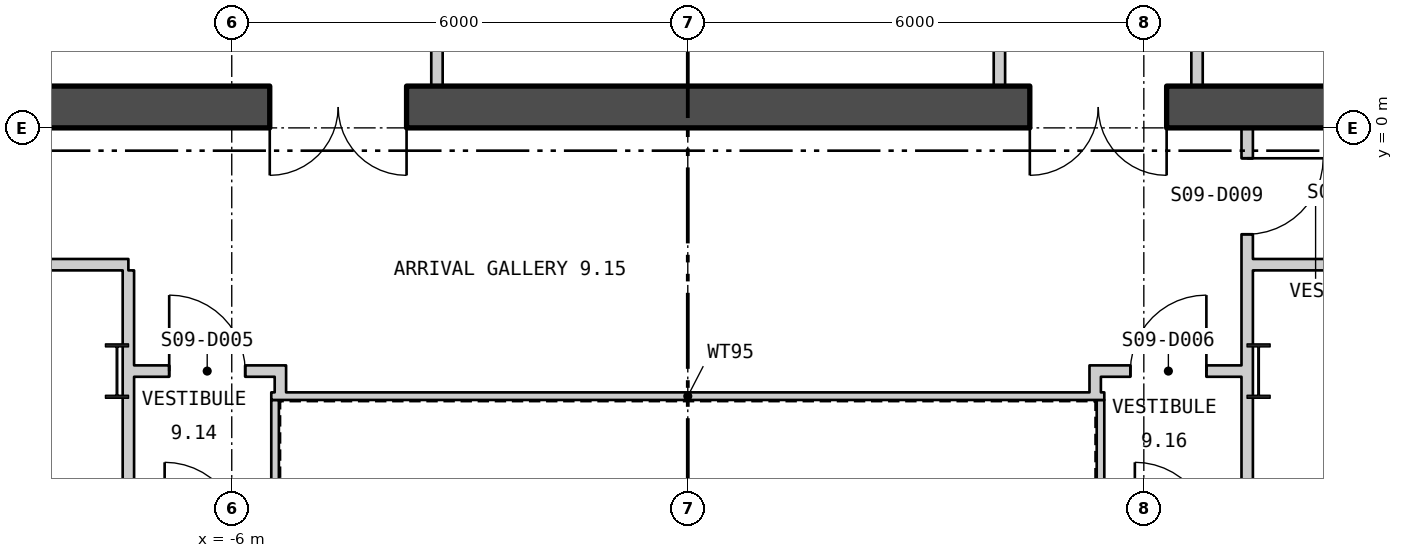
"""IFC4 building model, lengths in metres.
Left out: names, types, materials, properties, quantities, classifications, styles, units other than length and angle.
Written with IfcOpenShell. Run it as: python <this file> out.ifc"""

import sys

from ifc_helpers import new_model, si_unit, direction, frame, frame_2d, origin, origin_2d, place, context, subcontext, project, spatial, polyline, rectangle, i_section, outline, extrude, element, fill, save


model = new_model("IFC4")
c1 = context("Model", 3, precision=1e-05, world=origin(), true_north=direction((0.0, 1.0)))
c2 = subcontext(c1, "Body", "Model", "MODEL_VIEW")
j1 = project(units=[si_unit("LENGTHUNIT", "METRE"), si_unit("PLANEANGLEUNIT", "RADIAN")], contexts=[c1])
p1 = place(None, origin())
s1 = spatial("IfcSite", under=j1, at=p1, CompositionType="ELEMENT")
p2 = place(p1, origin())
s2 = spatial("IfcBuilding", under=s1, at=p2, CompositionType="ELEMENT")
p3 = place(p2, frame((0.0, 0.0, 124.8)))
s3 = spatial("IfcBuildingStorey", under=s2, at=p3, CompositionType="ELEMENT", Elevation=124.8)
for number, where, z_axis, x_axis in (
    (1, (7.51, -3.2, 0.0), (0.0, 0.0, 1.0), (1.0, 0.0, 0.0)),
    (2, (-7.51, -3.2, 0.0), (0.0, 0.0, 1.0), (1.0, 0.0, 0.0)),
):
    element("IfcColumn", number, at=place(p3, frame(where, z_axis=z_axis, x_axis=x_axis)), inside=s3, PredefinedType="COLUMN", context=c2, shape_type="SweptSolid", body=[
        extrude(i_section(OverallWidth=0.304, OverallDepth=0.716, WebThickness=0.021, FlangeThickness=0.04, at=origin_2d()), origin(), (0.0, 0.0, 1.0), 4.5),
    ])
p4 = place(p3, frame((-27.45, 12.042, -0.18), z_axis=(0.0, 0.0, 1.0), x_axis=(0.500000711659, -0.866024992908, 0.0)))
e3 = element("IfcWall", 3, at=p4, inside=s3, PredefinedType="SOLIDWALL", context=c2, shape_type="SweptSolid", body=[
    extrude(outline(polyline([(-0.13, -0.225), (45.87, -0.225), (45.61, 0.225), (0.13, 0.225), (-0.13, -0.225)])), origin(), (0.0, 0.0, 1.0), 4.28),
])
p5 = place(p4, frame((1.424, 0.0, 1.08)))
e4 = element("IfcOpeningElement", 4, at=p5, cuts=e3, PredefinedType="OPENING", context=c2, shape_type="SweptSolid", body=[
    extrude(rectangle(XDim=2.4, YDim=2.6, at=frame_2d((1.2, 1.3))), frame((0.0, 0.235, 0.0), z_axis=(0.0, -1.0, 0.0), x_axis=(1.0, 0.0, 0.0)), (0.0, 0.0, 1.0), 0.47),
])
p6 = place(p4, frame((5.893, 0.0, 1.08)))
e5 = element("IfcOpeningElement", 5, at=p6, cuts=e3, PredefinedType="OPENING", context=c2, shape_type="SweptSolid", body=[
    extrude(rectangle(XDim=2.4, YDim=2.6, at=frame_2d((1.2, 1.3))), frame((0.0, 0.235, 0.0), z_axis=(0.0, -1.0, 0.0), x_axis=(1.0, 0.0, 0.0)), (0.0, 0.0, 1.0), 0.47),
])
p7 = place(p4, frame((10.401, 0.0, 1.08)))
e6 = element("IfcOpeningElement", 6, at=p7, cuts=e3, PredefinedType="OPENING", context=c2, shape_type="SweptSolid", body=[
    extrude(rectangle(XDim=2.4, YDim=2.6, at=frame_2d((1.2, 1.3))), frame((0.0, 0.235, 0.0), z_axis=(0.0, -1.0, 0.0), x_axis=(1.0, 0.0, 0.0)), (0.0, 0.0, 1.0), 0.47),
])
p8 = place(p4, frame((19.416, 0.0, 1.08)))
e7 = element("IfcOpeningElement", 7, at=p8, cuts=e3, PredefinedType="OPENING", context=c2, shape_type="SweptSolid", body=[
    extrude(rectangle(XDim=2.4, YDim=2.6, at=frame_2d((1.2, 1.3))), frame((0.0, 0.235, 0.0), z_axis=(0.0, -1.0, 0.0), x_axis=(1.0, 0.0, 0.0)), (0.0, 0.0, 1.0), 0.47),
])
p9 = place(p4, frame((23.924, 0.0, 1.08)))
e8 = element("IfcOpeningElement", 8, at=p9, cuts=e3, PredefinedType="OPENING", context=c2, shape_type="SweptSolid", body=[
    extrude(rectangle(XDim=2.4, YDim=2.6, at=frame_2d((1.2, 1.3))), frame((0.0, 0.235, 0.0), z_axis=(0.0, -1.0, 0.0), x_axis=(1.0, 0.0, 0.0)), (0.0, 0.0, 1.0), 0.47),
])
p10 = place(p4, frame((28.431, 0.0, 1.08)))
e9 = element("IfcOpeningElement", 9, at=p10, cuts=e3, PredefinedType="OPENING", context=c2, shape_type="SweptSolid", body=[
    extrude(rectangle(XDim=2.4, YDim=2.6, at=frame_2d((1.2, 1.3))), frame((0.0, 0.235, 0.0), z_axis=(0.0, -1.0, 0.0), x_axis=(1.0, 0.0, 0.0)), (0.0, 0.0, 1.0), 0.47),
])
p11 = place(p4, frame((32.939, 0.0, 1.08)))
e10 = element("IfcOpeningElement", 10, at=p11, cuts=e3, PredefinedType="OPENING", context=c2, shape_type="SweptSolid", body=[
    extrude(rectangle(XDim=2.4, YDim=2.6, at=frame_2d((1.2, 1.3))), frame((0.0, 0.235, 0.0), z_axis=(0.0, -1.0, 0.0), x_axis=(1.0, 0.0, 0.0)), (0.0, 0.0, 1.0), 0.47),
])
p12 = place(p4, frame((37.447, 0.0, 1.08)))
e11 = element("IfcOpeningElement", 11, at=p12, cuts=e3, PredefinedType="OPENING", context=c2, shape_type="SweptSolid", body=[
    extrude(rectangle(XDim=2.4, YDim=2.6, at=frame_2d((1.2, 1.3))), frame((0.0, 0.235, 0.0), z_axis=(0.0, -1.0, 0.0), x_axis=(1.0, 0.0, 0.0)), (0.0, 0.0, 1.0), 0.47),
])
p13 = place(p4, frame((41.916, 0.0, 1.08)))
e12 = element("IfcOpeningElement", 12, at=p13, cuts=e3, PredefinedType="OPENING", context=c2, shape_type="SweptSolid", body=[
    extrude(rectangle(XDim=2.4, YDim=2.6, at=frame_2d((1.2, 1.3))), frame((0.0, 0.235, 0.0), z_axis=(0.0, -1.0, 0.0), x_axis=(1.0, 0.0, 0.0)), (0.0, 0.0, 1.0), 0.47),
])
p14 = place(p3, frame((4.58, -27.57, -0.18), z_axis=(0.0, 0.0, 1.0), x_axis=(0.500000711659, 0.866024992908, 0.0)))
e13 = element("IfcWall", 13, at=p14, inside=s3, PredefinedType="SOLIDWALL", context=c2, shape_type="SweptSolid", body=[
    extrude(outline(polyline([(-0.13, -0.225), (45.87, -0.225), (45.61, 0.225), (0.13, 0.225), (-0.13, -0.225)])), origin(), (0.0, 0.0, 1.0), 4.28),
])
p15 = place(p14, frame((1.424, 0.0, 1.08)))
e14 = element("IfcOpeningElement", 14, at=p15, cuts=e13, PredefinedType="OPENING", context=c2, shape_type="SweptSolid", body=[
    extrude(rectangle(XDim=2.4, YDim=2.6, at=frame_2d((1.2, 1.3))), frame((0.0, 0.235, 0.0), z_axis=(0.0, -1.0, 0.0), x_axis=(1.0, 0.0, 0.0)), (0.0, 0.0, 1.0), 0.47),
])
p16 = place(p14, frame((5.893, 0.0, 1.08)))
e15 = element("IfcOpeningElement", 15, at=p16, cuts=e13, PredefinedType="OPENING", context=c2, shape_type="SweptSolid", body=[
    extrude(rectangle(XDim=2.4, YDim=2.6, at=frame_2d((1.2, 1.3))), frame((0.0, 0.235, 0.0), z_axis=(0.0, -1.0, 0.0), x_axis=(1.0, 0.0, 0.0)), (0.0, 0.0, 1.0), 0.47),
])
p17 = place(p14, frame((10.401, 0.0, 1.08)))
e16 = element("IfcOpeningElement", 16, at=p17, cuts=e13, PredefinedType="OPENING", context=c2, shape_type="SweptSolid", body=[
    extrude(rectangle(XDim=2.4, YDim=2.6, at=frame_2d((1.2, 1.3))), frame((0.0, 0.235, 0.0), z_axis=(0.0, -1.0, 0.0), x_axis=(1.0, 0.0, 0.0)), (0.0, 0.0, 1.0), 0.47),
])
p18 = place(p14, frame((14.909, 0.0, 1.08)))
e17 = element("IfcOpeningElement", 17, at=p18, cuts=e13, PredefinedType="OPENING", context=c2, shape_type="SweptSolid", body=[
    extrude(rectangle(XDim=2.4, YDim=2.6, at=frame_2d((1.2, 1.3))), frame((0.0, 0.235, 0.0), z_axis=(0.0, -1.0, 0.0), x_axis=(1.0, 0.0, 0.0)), (0.0, 0.0, 1.0), 0.47),
])
p19 = place(p14, frame((19.416, 0.0, 1.08)))
e18 = element("IfcOpeningElement", 18, at=p19, cuts=e13, PredefinedType="OPENING", context=c2, shape_type="SweptSolid", body=[
    extrude(rectangle(XDim=2.4, YDim=2.6, at=frame_2d((1.2, 1.3))), frame((0.0, 0.235, 0.0), z_axis=(0.0, -1.0, 0.0), x_axis=(1.0, 0.0, 0.0)), (0.0, 0.0, 1.0), 0.47),
])
p20 = place(p14, frame((23.924, 0.0, 1.08)))
e19 = element("IfcOpeningElement", 19, at=p20, cuts=e13, PredefinedType="OPENING", context=c2, shape_type="SweptSolid", body=[
    extrude(rectangle(XDim=2.4, YDim=2.6, at=frame_2d((1.2, 1.3))), frame((0.0, 0.235, 0.0), z_axis=(0.0, -1.0, 0.0), x_axis=(1.0, 0.0, 0.0)), (0.0, 0.0, 1.0), 0.47),
])
p21 = place(p14, frame((32.939, 0.0, 1.08)))
e20 = element("IfcOpeningElement", 20, at=p21, cuts=e13, PredefinedType="OPENING", context=c2, shape_type="SweptSolid", body=[
    extrude(rectangle(XDim=2.4, YDim=2.6, at=frame_2d((1.2, 1.3))), frame((0.0, 0.235, 0.0), z_axis=(0.0, -1.0, 0.0), x_axis=(1.0, 0.0, 0.0)), (0.0, 0.0, 1.0), 0.47),
])
p22 = place(p14, frame((37.447, 0.0, 1.08)))
e21 = element("IfcOpeningElement", 21, at=p22, cuts=e13, PredefinedType="OPENING", context=c2, shape_type="SweptSolid", body=[
    extrude(rectangle(XDim=2.4, YDim=2.6, at=frame_2d((1.2, 1.3))), frame((0.0, 0.235, 0.0), z_axis=(0.0, -1.0, 0.0), x_axis=(1.0, 0.0, 0.0)), (0.0, 0.0, 1.0), 0.47),
])
p23 = place(p14, frame((41.916, 0.0, 1.08)))
e22 = element("IfcOpeningElement", 22, at=p23, cuts=e13, PredefinedType="OPENING", context=c2, shape_type="SweptSolid", body=[
    extrude(rectangle(XDim=2.4, YDim=2.6, at=frame_2d((1.2, 1.3))), frame((0.0, 0.235, 0.0), z_axis=(0.0, -1.0, 0.0), x_axis=(1.0, 0.0, 0.0)), (0.0, 0.0, 1.0), 0.47),
])
p24 = place(p3, frame((5.43, -11.62, 0.0), z_axis=(0.0, 0.0, 1.0), x_axis=(0.0, 1.0, 0.0)))
e23 = element("IfcWall", 23, at=p24, inside=s3, PredefinedType="PARTITIONING", context=c2, shape_type="SweptSolid", body=[
    extrude(rectangle(XDim=8.04, YDim=0.1, at=frame_2d((4.02, 0.0))), origin(), (0.0, 0.0, 1.0), 4.3),
])
p25 = place(p3, frame((5.48, -3.53, 0.0), z_axis=(0.0, 0.0, 1.0), x_axis=(-1.0, 0.0, 0.0)))
e24 = element("IfcWall", 24, at=p25, inside=s3, PredefinedType="PARTITIONING", context=c2, shape_type="SweptSolid", body=[
    extrude(rectangle(XDim=10.96, YDim=0.1, at=frame_2d((5.48, 0.0))), origin(), (0.0, 0.0, 1.0), 4.3),
])
p26 = place(p3, frame((-5.43, -3.58, 0.0), z_axis=(0.0, 0.0, 1.0), x_axis=(0.0, -1.0, 0.0)))
e25 = element("IfcWall", 25, at=p26, inside=s3, PredefinedType="PARTITIONING", context=c2, shape_type="SweptSolid", body=[
    extrude(rectangle(XDim=8.04, YDim=0.1, at=frame_2d((4.02, 0.0))), origin(), (0.0, 0.0, 1.0), 4.3),
])
p27 = place(p3, frame((-17.5, 0.275, 0.0), z_axis=(0.0, 0.0, 1.0), x_axis=(1.0, 0.0, 0.0)))
e26 = element("IfcWall", 26, at=p27, inside=s3, PredefinedType="SHEAR", context=c2, shape_type="SweptSolid", body=[
    extrude(rectangle(XDim=35.0, YDim=0.55, at=frame_2d((17.5, 0.0))), origin(), (0.0, 0.0, 1.0), 4.3),
])
p28 = place(p27, frame((12.0, 0.0, 0.0)))
e27 = element("IfcOpeningElement", 27, at=p28, cuts=e26, PredefinedType="OPENING", context=c2, shape_type="SweptSolid", body=[
    extrude(rectangle(XDim=1.8, YDim=2.4, at=frame_2d((0.9, 1.2))), frame((0.0, 0.285, 0.0), z_axis=(0.0, -1.0, 0.0), x_axis=(1.0, 0.0, 0.0)), (0.0, 0.0, 1.0), 0.57),
])
p29 = place(p27, frame((22.0, 0.0, 0.0)))
e28 = element("IfcOpeningElement", 28, at=p29, cuts=e26, PredefinedType="OPENING", context=c2, shape_type="SweptSolid", body=[
    extrude(rectangle(XDim=1.8, YDim=2.4, at=frame_2d((0.9, 1.2))), frame((0.0, 0.285, 0.0), z_axis=(0.0, -1.0, 0.0), x_axis=(1.0, 0.0, 0.0)), (0.0, 0.0, 1.0), 0.57),
])
for number, where, z_axis, x_axis in (
    (29, (-3.3, 0.55, 0.0), (0.0, 0.0, 1.0), (0.0, 1.0, 0.0)),
    (30, (4.1, 0.55, 0.0), (0.0, 0.0, 1.0), (0.0, 1.0, 0.0)),
):
    element("IfcWall", number, at=place(p3, frame(where, z_axis=z_axis, x_axis=x_axis)), inside=s3, PredefinedType="PARTITIONING", context=c2, shape_type="SweptSolid", body=[
        extrude(rectangle(XDim=3.275, YDim=0.15, at=frame_2d((1.637, 0.0))), origin(), (0.0, 0.0, 1.0), 4.3),
    ])
p30 = place(p3, frame((6.7, 0.55, 0.0), z_axis=(0.0, 0.0, 1.0), x_axis=(0.0, 1.0, 0.0)))
e31 = element("IfcWall", 31, at=p30, inside=s3, PredefinedType="PARTITIONING", context=c2, shape_type="SweptSolid", body=[
    extrude(rectangle(XDim=3.075, YDim=0.15, at=frame_2d((1.538, 0.0))), origin(), (0.0, 0.0, 1.0), 4.3),
])
p31 = place(p3, frame((-19.198, -1.8, 0.0), z_axis=(0.0, 0.0, 1.0), x_axis=(1.0, 0.0, 0.0)))
e32 = element("IfcWall", 32, at=p31, inside=s3, PredefinedType="PARTITIONING", context=c2, shape_type="SweptSolid", body=[
    extrude(rectangle(XDim=11.838, YDim=0.15, at=frame_2d((5.919, 0.0))), origin(), (0.0, 0.0, 1.0), 4.3),
])
p32 = place(p3, frame((-7.36, -13.675, 0.0), z_axis=(0.0, 0.0, 1.0), x_axis=(0.0, 1.0, 0.0)))
e33 = element("IfcWall", 33, at=p32, inside=s3, PredefinedType="PARTITIONING", context=c2, shape_type="SweptSolid", body=[
    extrude(rectangle(XDim=10.167, YDim=0.15, at=frame_2d((5.083, 0.0))), origin(), (0.0, 0.0, 1.0), 3.7),
])
p33 = place(p3, frame((-7.36, -3.508, 0.0), z_axis=(0.0, 0.0, 1.0), x_axis=(0.0, 1.0, 0.0)))
e34 = element("IfcWall", 34, at=p33, inside=s3, PredefinedType="PARTITIONING", context=c2, shape_type="SweptSolid", body=[
    extrude(rectangle(XDim=1.633, YDim=0.15, at=frame_2d((0.817, 0.0))), origin(), (0.0, 0.0, 1.0), 4.3),
])
p34 = place(p3, frame((-7.285, -3.2, 0.0), z_axis=(0.0, 0.0, 1.0), x_axis=(1.0, 0.0, 0.0)))
e35 = element("IfcWall", 35, at=p34, inside=s3, PredefinedType="PARTITIONING", context=c2, shape_type="SweptSolid", body=[
    extrude(rectangle(XDim=2.0, YDim=0.15, at=frame_2d((1.0, 0.0))), origin(), (0.0, 0.0, 1.0), 3.39),
])
p35 = place(p34, frame((0.462, 0.0, 0.0)))
e36 = element("IfcOpeningElement", 36, at=p35, cuts=e35, PredefinedType="OPENING", context=c2, shape_type="SweptSolid", body=[
    extrude(rectangle(XDim=1.0, YDim=2.1, at=frame_2d((0.5, 1.05))), frame((0.0, 0.085, 0.0), z_axis=(0.0, -1.0, 0.0), x_axis=(1.0, 0.0, 0.0)), (0.0, 0.0, 1.0), 0.17),
])
p36 = place(p3, frame((-5.36, -3.48, 0.0), z_axis=(0.0, 0.0, 1.0), x_axis=(0.0, 1.0, 0.0)))
e37 = element("IfcWall", 37, at=p36, inside=s3, PredefinedType="PARTITIONING", context=c2, shape_type="SweptSolid", body=[
    extrude(rectangle(XDim=0.205, YDim=0.15, at=frame_2d((0.102, 0.0))), origin(), (0.0, 0.0, 1.0), 4.3),
])
p37 = place(p3, frame((5.285, -3.2, 0.0), z_axis=(0.0, 0.0, 1.0), x_axis=(1.0, 0.0, 0.0)))
e38 = element("IfcWall", 38, at=p37, inside=s3, PredefinedType="PARTITIONING", context=c2, shape_type="SweptSolid", body=[
    extrude(rectangle(XDim=2.0, YDim=0.15, at=frame_2d((1.0, 0.0))), origin(), (0.0, 0.0, 1.0), 3.39),
])
p38 = place(p37, frame((0.538, 0.0, 0.0)))
e39 = element("IfcOpeningElement", 39, at=p38, cuts=e38, PredefinedType="OPENING", context=c2, shape_type="SweptSolid", body=[
    extrude(rectangle(XDim=1.0, YDim=2.1, at=frame_2d((0.5, 1.05))), frame((0.0, 0.085, 0.0), z_axis=(0.0, -1.0, 0.0), x_axis=(1.0, 0.0, 0.0)), (0.0, 0.0, 1.0), 0.17),
])
p39 = place(p3, frame((5.36, -3.48, 0.0), z_axis=(0.0, 0.0, 1.0), x_axis=(0.0, 1.0, 0.0)))
e40 = element("IfcWall", 40, at=p39, inside=s3, PredefinedType="PARTITIONING", context=c2, shape_type="SweptSolid", body=[
    extrude(rectangle(XDim=0.205, YDim=0.15, at=frame_2d((0.102, 0.0))), origin(), (0.0, 0.0, 1.0), 4.3),
])
p40 = place(p3, frame((7.36, -13.675, 0.0), z_axis=(0.0, 0.0, 1.0), x_axis=(0.0, 1.0, 0.0)))
e41 = element("IfcWall", 41, at=p40, inside=s3, PredefinedType="PARTITIONING", context=c2, shape_type="SweptSolid", body=[
    extrude(rectangle(XDim=10.167, YDim=0.15, at=frame_2d((5.083, 0.0))), origin(), (0.0, 0.0, 1.0), 3.7),
])
p41 = place(p40, frame((3.531, 0.0, 0.0)))
e42 = element("IfcOpeningElement", 42, at=p41, cuts=e41, PredefinedType="OPENING", context=c2, shape_type="SweptSolid", body=[
    extrude(rectangle(XDim=1.0, YDim=2.1, at=frame_2d((0.5, 1.05))), frame((0.0, 0.085, 0.0), z_axis=(0.0, -1.0, 0.0), x_axis=(1.0, 0.0, 0.0)), (0.0, 0.0, 1.0), 0.17),
])
p42 = place(p3, frame((7.36, -3.508, 0.0), z_axis=(0.0, 0.0, 1.0), x_axis=(0.0, 1.0, 0.0)))
e43 = element("IfcWall", 43, at=p42, inside=s3, PredefinedType="PARTITIONING", context=c2, shape_type="SweptSolid", body=[
    extrude(rectangle(XDim=3.508, YDim=0.15, at=frame_2d((1.754, 0.0))), origin(), (0.0, 0.0, 1.0), 4.3),
])
p43 = place(p42, frame((2.108, 0.0, 0.0)))
e44 = element("IfcOpeningElement", 44, at=p43, cuts=e43, PredefinedType="OPENING", context=c2, shape_type="SweptSolid", body=[
    extrude(rectangle(XDim=1.0, YDim=2.1, at=frame_2d((0.5, 1.05))), frame((0.0, 0.085, 0.0), z_axis=(0.0, -1.0, 0.0), x_axis=(1.0, 0.0, 0.0)), (0.0, 0.0, 1.0), 0.17),
])
p44 = place(p3, frame((7.435, -1.8, 0.0), z_axis=(0.0, 0.0, 1.0), x_axis=(1.0, 0.0, 0.0)))
e45 = element("IfcWall", 45, at=p44, inside=s3, PredefinedType="PARTITIONING", context=c2, shape_type="SweptSolid", body=[
    extrude(rectangle(XDim=11.763, YDim=0.15, at=frame_2d((5.881, 0.0))), origin(), (0.0, 0.0, 1.0), 4.3),
])
p45 = place(p44, frame((8.877, 0.0, 0.0)))
e46 = element("IfcOpeningElement", 46, at=p45, cuts=e45, PredefinedType="OPENING", context=c2, shape_type="SweptSolid", body=[
    extrude(rectangle(XDim=1.0, YDim=2.1, at=frame_2d((0.5, 1.05))), frame((0.0, 0.085, 0.0), z_axis=(0.0, -1.0, 0.0), x_axis=(1.0, 0.0, 0.0)), (0.0, 0.0, 1.0), 0.17),
])
p46 = place(p28, origin())
e47 = element("IfcDoor", 47, at=p46, inside=s3, OperationType="DOUBLE_DOOR_SINGLE_SWING", PredefinedType="DOOR", context=c2, shape_type="SweptSolid", body=[
    extrude(rectangle(XDim=1.8, YDim=2.4, at=frame_2d((0.9, 1.2))), frame((0.0, 0.025, 0.0), z_axis=(0.0, -1.0, 0.0), x_axis=(1.0, 0.0, 0.0)), (0.0, 0.0, 1.0), 0.05),
])
fill(e27, e47)
p47 = place(p29, origin())
e48 = element("IfcDoor", 48, at=p47, inside=s3, OperationType="DOUBLE_DOOR_SINGLE_SWING", PredefinedType="DOOR", context=c2, shape_type="SweptSolid", body=[
    extrude(rectangle(XDim=1.8, YDim=2.4, at=frame_2d((0.9, 1.2))), frame((0.0, 0.025, 0.0), z_axis=(0.0, -1.0, 0.0), x_axis=(1.0, 0.0, 0.0)), (0.0, 0.0, 1.0), 0.05),
])
fill(e28, e48)
p48 = place(p35, origin())
e49 = element("IfcDoor", 49, at=p48, inside=s3, OperationType="SINGLE_SWING_RIGHT", PredefinedType="DOOR", context=c2, shape_type="SweptSolid", body=[
    extrude(rectangle(XDim=1.0, YDim=2.1, at=frame_2d((0.5, 1.05))), frame((0.0, 0.025, 0.0), z_axis=(0.0, -1.0, 0.0), x_axis=(1.0, 0.0, 0.0)), (0.0, 0.0, 1.0), 0.05),
])
fill(e36, e49)
p49 = place(p38, origin())
e50 = element("IfcDoor", 50, at=p49, inside=s3, OperationType="SINGLE_SWING_LEFT", PredefinedType="DOOR", context=c2, shape_type="SweptSolid", body=[
    extrude(rectangle(XDim=1.0, YDim=2.1, at=frame_2d((0.5, 1.05))), frame((0.0, 0.025, 0.0), z_axis=(0.0, -1.0, 0.0), x_axis=(1.0, 0.0, 0.0)), (0.0, 0.0, 1.0), 0.05),
])
fill(e39, e50)
p50 = place(p43, origin())
e51 = element("IfcDoor", 51, at=p50, inside=s3, OperationType="SINGLE_SWING_RIGHT", PredefinedType="DOOR", context=c2, shape_type="SweptSolid", body=[
    extrude(rectangle(XDim=1.0, YDim=2.1, at=frame_2d((0.5, 1.05))), frame((0.0, 0.025, 0.0), z_axis=(0.0, -1.0, 0.0), x_axis=(1.0, 0.0, 0.0)), (0.0, 0.0, 1.0), 0.05),
])
fill(e44, e51)
save(model, sys.argv[1])
